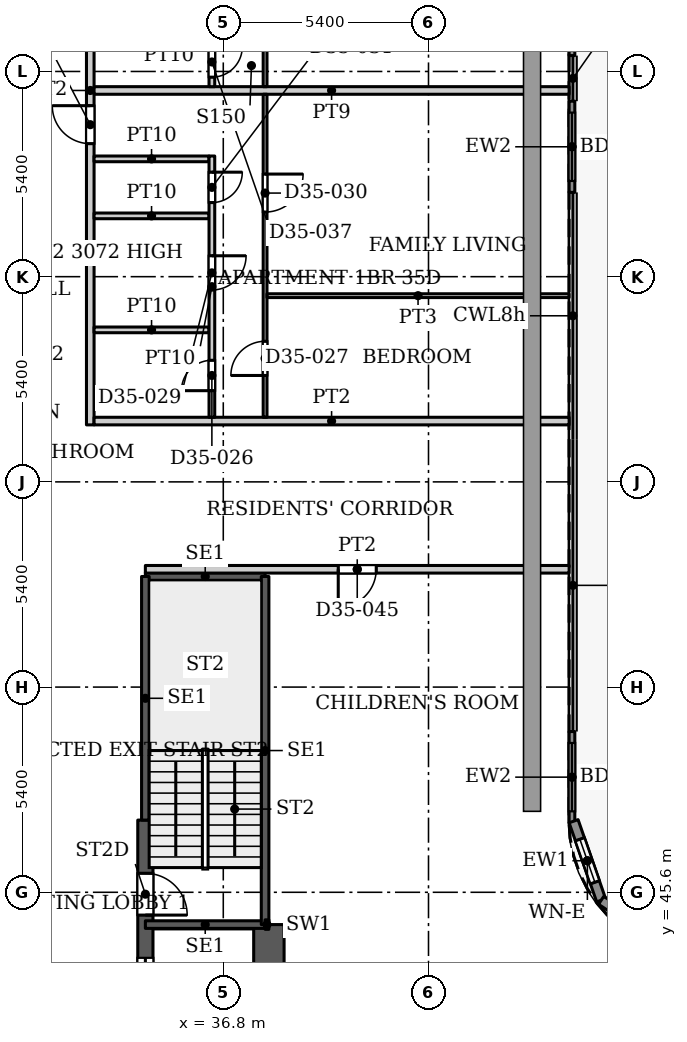
"""IFC4 building model, lengths in metres.
Left out: names, types, materials, properties, quantities, classifications, styles, units other than length and angle.
Written with IfcOpenShell. Run it as: python <this file> out.ifc"""

import sys

from ifc_helpers import new_model, si_unit, direction, frame, frame_2d, origin, place, context, subcontext, project, spatial, rectangle, extrude, source, transform, mapped, element, fill, save


model = new_model("IFC4")
c1 = context("Model", 3, precision=1e-05, world=origin(), true_north=direction((0.0, 1.0)))
c2 = subcontext(c1, "Body", "Model", "MODEL_VIEW")
j1 = project(units=[si_unit("LENGTHUNIT", "METRE"), si_unit("PLANEANGLEUNIT", "RADIAN")], contexts=[c1])
p1 = place(None, origin())
s1 = spatial("IfcSite", under=j1, at=p1, CompositionType="ELEMENT")
p2 = place(p1, origin())
s2 = spatial("IfcBuilding", under=s1, at=p2, CompositionType="ELEMENT")
p3 = place(p2, frame((0.0, 0.0, 152.6)))
s3 = spatial("IfcBuildingStorey", under=s2, at=p3, CompositionType="ELEMENT", Elevation=152.6)
p4 = place(p3, frame((34.75, 29.05, 0.0), z_axis=(0.0, 0.0, 1.0), x_axis=(0.0, 1.0, 0.0)))
e1 = element("IfcWall", 1, at=p4, inside=s3, PredefinedType="SHEAR", context=c2, shape_type="SweptSolid", body=[
    extrude(rectangle(XDim=18.45, YDim=0.4, at=frame_2d((9.225, 0.0))), origin(), (0.0, 0.0, 1.0), 3.9),
])
p5 = place(p4, frame((8.025, 0.0, 0.0)))
e2 = element("IfcOpeningElement", 2, at=p5, cuts=e1, PredefinedType="OPENING", context=c2, shape_type="SweptSolid", body=[
    extrude(rectangle(XDim=1.1, YDim=2.2, at=frame_2d((0.55, 1.1))), frame((0.0, 0.21, 0.0), z_axis=(0.0, -1.0, 0.0), x_axis=(1.0, 0.0, 0.0)), (0.0, 0.0, 1.0), 0.42),
])
p6 = place(p4, frame((10.875, 0.0, 0.0)))
e3 = element("IfcOpeningElement", 3, at=p6, cuts=e1, PredefinedType="OPENING", context=c2, shape_type="SweptSolid", body=[
    extrude(rectangle(XDim=1.1, YDim=2.2, at=frame_2d((0.55, 1.1))), frame((0.0, 0.21, 0.0), z_axis=(0.0, -1.0, 0.0), x_axis=(1.0, 0.0, 0.0)), (0.0, 0.0, 1.0), 0.42),
])
p7 = place(p4, frame((13.725, 0.0, 0.0)))
e4 = element("IfcOpeningElement", 4, at=p7, cuts=e1, PredefinedType="OPENING", context=c2, shape_type="SweptSolid", body=[
    extrude(rectangle(XDim=1.1, YDim=2.2, at=frame_2d((0.55, 1.1))), frame((0.0, 0.21, 0.0), z_axis=(0.0, -1.0, 0.0), x_axis=(1.0, 0.0, 0.0)), (0.0, 0.0, 1.0), 0.42),
])
p8 = place(p4, frame((15.95, 0.0, 0.0)))
e5 = element("IfcOpeningElement", 5, at=p8, cuts=e1, PredefinedType="OPENING", context=c2, shape_type="SweptSolid", body=[
    extrude(rectangle(XDim=1.1, YDim=2.2, at=frame_2d((0.55, 1.1))), frame((0.0, 0.21, 0.0), z_axis=(0.0, -1.0, 0.0), x_axis=(1.0, 0.0, 0.0)), (0.0, 0.0, 1.0), 0.42),
])
p9 = place(p3, frame((38.0, 36.2, 0.0), z_axis=(0.0, 0.0, 1.0), x_axis=(0.0, 1.0, 0.0)))
e6 = element("IfcWall", 6, at=p9, inside=s3, PredefinedType="SHEAR", context=c2, shape_type="SweptSolid", body=[
    extrude(rectangle(XDim=8.55, YDim=0.8, at=frame_2d((4.275, 0.0))), origin(), (0.0, 0.0, 1.0), 3.9),
])
p10 = place(p3, frame((45.975, 70.018, 0.0), z_axis=(0.0, 0.0, 1.0), x_axis=(0.0, -1.0, 0.0)))
e7 = element("IfcWall", 7, at=p10, inside=s3, PredefinedType="SOLIDWALL", context=c2, shape_type="SweptSolid", body=[
    extrude(rectangle(XDim=2.4, YDim=0.15, at=frame_2d((1.2, 0.0))), origin(), (0.0, 0.0, 1.0), 3.75),
])
p11 = place(p10, frame((0.3, 0.0, 0.0)))
e8 = element("IfcOpeningElement", 8, at=p11, cuts=e7, PredefinedType="OPENING", context=c2, shape_type="SweptSolid", body=[
    extrude(rectangle(XDim=1.8, YDim=2.4, at=frame_2d((0.9, 1.2))), frame((0.0, 0.085, 0.0), z_axis=(0.0, -1.0, 0.0), x_axis=(1.0, 0.0, 0.0)), (0.0, 0.0, 1.0), 0.17),
])
p12 = place(p3, frame((45.975, 66.418, 0.0), z_axis=(0.0, 0.0, 1.0), x_axis=(0.0, -1.0, 0.0)))
e9 = element("IfcWall", 9, at=p12, inside=s3, PredefinedType="SOLIDWALL", context=c2, shape_type="SweptSolid", body=[
    extrude(rectangle(XDim=2.4, YDim=0.15, at=frame_2d((1.2, 0.0))), origin(), (0.0, 0.0, 1.0), 3.75),
])
p13 = place(p12, frame((0.3, 0.0, 0.0)))
e10 = element("IfcOpeningElement", 10, at=p13, cuts=e9, PredefinedType="OPENING", context=c2, shape_type="SweptSolid", body=[
    extrude(rectangle(XDim=1.8, YDim=2.4, at=frame_2d((0.9, 1.2))), frame((0.0, 0.085, 0.0), z_axis=(0.0, -1.0, 0.0), x_axis=(1.0, 0.0, 0.0)), (0.0, 0.0, 1.0), 0.17),
])
p14 = place(p3, frame((45.975, 49.83, 0.0), z_axis=(0.0, 0.0, 1.0), x_axis=(0.0, -1.0, 0.0)))
e11 = element("IfcWall", 11, at=p14, inside=s3, PredefinedType="SOLIDWALL", context=c2, shape_type="SweptSolid", body=[
    extrude(rectangle(XDim=2.4, YDim=0.15, at=frame_2d((1.2, 0.0))), origin(), (0.0, 0.0, 1.0), 3.75),
])
p15 = place(p14, frame((0.3, 0.0, 0.0)))
e12 = element("IfcOpeningElement", 12, at=p15, cuts=e11, PredefinedType="OPENING", context=c2, shape_type="SweptSolid", body=[
    extrude(rectangle(XDim=1.8, YDim=2.4, at=frame_2d((0.9, 1.2))), frame((0.0, 0.085, 0.0), z_axis=(0.0, -1.0, 0.0), x_axis=(1.0, 0.0, 0.0)), (0.0, 0.0, 1.0), 0.17),
])
p16 = place(p3, frame((46.018, 47.471, 0.0), z_axis=(0.0, 0.0, 1.0), x_axis=(0.328791208903, -0.944402637093, 0.0)))
e13 = element("IfcWall", 13, at=p16, inside=s3, PredefinedType="SOLIDWALL", context=c2, shape_type="SweptSolid", body=[
    extrude(rectangle(XDim=2.205, YDim=0.25, at=frame_2d((1.102, 0.0))), origin(), (0.0, 0.0, 1.0), 3.75),
])
p17 = place(p16, frame((0.503, 0.0, 0.6)))
e14 = element("IfcOpeningElement", 14, at=p17, cuts=e13, PredefinedType="OPENING", context=c2, shape_type="SweptSolid", body=[
    extrude(rectangle(XDim=1.2, YDim=2.1, at=frame_2d((0.6, 1.05))), frame((0.0, 0.135, 0.0), z_axis=(0.0, -1.0, 0.0), x_axis=(1.0, 0.0, 0.0)), (0.0, 0.0, 1.0), 0.27),
])
p18 = place(p3, frame((46.743, 45.389, 0.0), z_axis=(0.0, 0.0, 1.0), x_axis=(0.831449265529, -0.555600682912, 0.0)))
e15 = element("IfcWall", 15, at=p18, inside=s3, PredefinedType="SOLIDWALL", context=c2, shape_type="SweptSolid", body=[
    extrude(rectangle(XDim=2.251, YDim=0.25, at=frame_2d((1.126, 0.0))), origin(), (0.0, 0.0, 1.0), 3.75),
])
p19 = place(p18, frame((0.525, 0.0, 0.6)))
e16 = element("IfcOpeningElement", 16, at=p19, cuts=e15, PredefinedType="OPENING", context=c2, shape_type="SweptSolid", body=[
    extrude(rectangle(XDim=1.2, YDim=2.1, at=frame_2d((0.6, 1.05))), frame((0.0, 0.135, 0.0), z_axis=(0.0, -1.0, 0.0), x_axis=(1.0, 0.0, 0.0)), (0.0, 0.0, 1.0), 0.27),
])
for number, where, z_axis, x_axis in (
    (17, (34.75, 44.75, 0.0), (0.0, 0.0, 1.0), (1.0, 0.0, 0.0)),
    (18, (34.75, 53.91, 0.0), (0.0, 0.0, 1.0), (1.0, 0.0, 0.0)),
):
    element("IfcWall", number, at=place(p3, frame(where, z_axis=z_axis, x_axis=x_axis)), inside=s3, PredefinedType="SHEAR", context=c2, shape_type="SweptSolid", body=[
        extrude(rectangle(XDim=3.15, YDim=0.2, at=frame_2d((1.575, 0.0))), origin(), (0.0, 0.0, 1.0), 3.9),
    ])
p20 = place(p3, frame((34.75, 47.5, 0.0), z_axis=(0.0, 0.0, 1.0), x_axis=(0.0, 1.0, 0.0)))
e19 = element("IfcWall", 19, at=p20, inside=s3, PredefinedType="SHEAR", context=c2, shape_type="SweptSolid", body=[
    extrude(rectangle(XDim=6.41, YDim=0.2, at=frame_2d((3.205, 0.0))), origin(), (0.0, 0.0, 1.0), 3.9),
])
p21 = place(p3, frame((37.9, 44.75, 0.0), z_axis=(0.0, 0.0, 1.0), x_axis=(0.0, 1.0, 0.0)))
e20 = element("IfcWall", 20, at=p21, inside=s3, PredefinedType="SHEAR", context=c2, shape_type="SweptSolid", body=[
    extrude(rectangle(XDim=9.16, YDim=0.2, at=frame_2d((4.58, 0.0))), origin(), (0.0, 0.0, 1.0), 3.9),
])
p22 = place(p3, frame((37.9, 44.75, 0.0), z_axis=(0.0, 0.0, 1.0), x_axis=(1.0, 0.0, 0.0)))
e21 = element("IfcWall", 21, at=p22, inside=s3, PredefinedType="PARTITIONING", context=c2, shape_type="SweptSolid", body=[
    extrude(rectangle(XDim=0.1, YDim=0.25, at=frame_2d((0.05, 0.0))), origin(), (0.0, 0.0, 1.0), 3.9),
])
p23 = place(p3, frame((33.3, 57.9, 0.0), z_axis=(0.0, 0.0, 1.0), x_axis=(0.0, 1.0, 0.0)))
e22 = element("IfcWall", 22, at=p23, inside=s3, PredefinedType="PARTITIONING", context=c2, shape_type="SweptSolid", body=[
    extrude(rectangle(XDim=17.6, YDim=0.2, at=frame_2d((8.8, 0.0))), origin(), (0.0, 0.0, 1.0), 3.6),
])
p24 = place(p23, frame((7.4, 0.0, 0.0)))
e23 = element("IfcOpeningElement", 23, at=p24, cuts=e22, PredefinedType="OPENING", context=c2, shape_type="SweptSolid", body=[
    extrude(rectangle(XDim=1.0, YDim=2.1, at=frame_2d((0.5, 1.05))), frame((0.0, 0.11, 0.0), z_axis=(0.0, -1.0, 0.0), x_axis=(1.0, 0.0, 0.0)), (0.0, 0.0, 1.0), 0.22),
])
p25 = place(p23, frame((13.1, 0.0, 0.0)))
e24 = element("IfcOpeningElement", 24, at=p25, cuts=e22, PredefinedType="OPENING", context=c2, shape_type="SweptSolid", body=[
    extrude(rectangle(XDim=1.0, YDim=2.1, at=frame_2d((0.5, 1.05))), frame((0.0, 0.11, 0.0), z_axis=(0.0, -1.0, 0.0), x_axis=(1.0, 0.0, 0.0)), (0.0, 0.0, 1.0), 0.22),
])
p26 = place(p3, frame((33.4, 58.0, 0.0), z_axis=(0.0, 0.0, 1.0), x_axis=(1.0, 0.0, 0.0)))
e25 = element("IfcWall", 25, at=p26, inside=s3, PredefinedType="PARTITIONING", context=c2, shape_type="SweptSolid", body=[
    extrude(rectangle(XDim=12.5, YDim=0.2, at=frame_2d((6.25, 0.0))), origin(), (0.0, 0.0, 1.0), 3.6),
])
for number, where, z_axis, x_axis in (
    (26, (33.4, 60.4, 0.0), (0.0, 0.0, 1.0), (1.0, 0.0, 0.0)),
    (27, (33.4, 63.4, 0.0), (0.0, 0.0, 1.0), (1.0, 0.0, 0.0)),
    (28, (33.4, 64.9, 0.0), (0.0, 0.0, 1.0), (1.0, 0.0, 0.0)),
):
    element("IfcWall", number, at=place(p3, frame(where, z_axis=z_axis, x_axis=x_axis)), inside=s3, PredefinedType="PARTITIONING", context=c2, shape_type="SweptSolid", body=[
        extrude(rectangle(XDim=3.025, YDim=0.15, at=frame_2d((1.513, 0.0))), origin(), (0.0, 0.0, 1.0), 3.6),
    ])
p27 = place(p3, frame((33.4, 66.7, 0.0), z_axis=(0.0, 0.0, 1.0), x_axis=(1.0, 0.0, 0.0)))
e29 = element("IfcWall", 29, at=p27, inside=s3, PredefinedType="PARTITIONING", context=c2, shape_type="SweptSolid", body=[
    extrude(rectangle(XDim=12.5, YDim=0.2, at=frame_2d((6.25, 0.0))), origin(), (0.0, 0.0, 1.0), 3.6),
])
p28 = place(p3, frame((34.75, 54.1, 0.0), z_axis=(0.0, 0.0, 1.0), x_axis=(1.0, 0.0, 0.0)))
e30 = element("IfcWall", 30, at=p28, inside=s3, PredefinedType="PARTITIONING", context=c2, shape_type="SweptSolid", body=[
    extrude(rectangle(XDim=11.15, YDim=0.2, at=frame_2d((5.575, 0.0))), origin(), (0.0, 0.0, 1.0), 3.6),
])
p29 = place(p28, frame((5.075, 0.0, 0.0)))
e31 = element("IfcOpeningElement", 31, at=p29, cuts=e30, PredefinedType="OPENING", context=c2, shape_type="SweptSolid", body=[
    extrude(rectangle(XDim=1.0, YDim=2.1, at=frame_2d((0.5, 1.05))), frame((0.0, 0.11, 0.0), z_axis=(0.0, -1.0, 0.0), x_axis=(1.0, 0.0, 0.0)), (0.0, 0.0, 1.0), 0.22),
])
p30 = place(p3, frame((36.5, 58.1, 0.0), z_axis=(0.0, 0.0, 1.0), x_axis=(0.0, 1.0, 0.0)))
e32 = element("IfcWall", 32, at=p30, inside=s3, PredefinedType="PARTITIONING", context=c2, shape_type="SweptSolid", body=[
    extrude(rectangle(XDim=6.875, YDim=0.15, at=frame_2d((3.438, 0.0))), origin(), (0.0, 0.0, 1.0), 3.6),
])
p31 = place(p30, frame((0.7, 0.0, 0.0)))
e33 = element("IfcOpeningElement", 33, at=p31, cuts=e32, PredefinedType="OPENING", context=c2, shape_type="SweptSolid", body=[
    extrude(rectangle(XDim=0.8, YDim=2.1, at=frame_2d((0.4, 1.05))), frame((0.0, 0.085, 0.0), z_axis=(0.0, -1.0, 0.0), x_axis=(1.0, 0.0, 0.0)), (0.0, 0.0, 1.0), 0.17),
])
p32 = place(p30, frame((3.35, 0.0, 0.0)))
e34 = element("IfcOpeningElement", 34, at=p32, cuts=e32, PredefinedType="OPENING", context=c2, shape_type="SweptSolid", body=[
    extrude(rectangle(XDim=0.9, YDim=2.1, at=frame_2d((0.45, 1.05))), frame((0.0, 0.085, 0.0), z_axis=(0.0, -1.0, 0.0), x_axis=(1.0, 0.0, 0.0)), (0.0, 0.0, 1.0), 0.17),
])
p33 = place(p30, frame((5.65, 0.0, 0.0)))
e35 = element("IfcOpeningElement", 35, at=p33, cuts=e32, PredefinedType="OPENING", context=c2, shape_type="SweptSolid", body=[
    extrude(rectangle(XDim=0.8, YDim=2.1, at=frame_2d((0.4, 1.05))), frame((0.0, 0.085, 0.0), z_axis=(0.0, -1.0, 0.0), x_axis=(1.0, 0.0, 0.0)), (0.0, 0.0, 1.0), 0.17),
])
p34 = place(p3, frame((36.5, 66.8, 0.0), z_axis=(0.0, 0.0, 1.0), x_axis=(0.0, 1.0, 0.0)))
e36 = element("IfcWall", 36, at=p34, inside=s3, PredefinedType="PARTITIONING", context=c2, shape_type="SweptSolid", body=[
    extrude(rectangle(XDim=3.875, YDim=0.15, at=frame_2d((1.938, 0.0))), origin(), (0.0, 0.0, 1.0), 3.6),
])
p35 = place(p34, frame((2.2, 0.0, 0.0)))
e37 = element("IfcOpeningElement", 37, at=p35, cuts=e36, PredefinedType="OPENING", context=c2, shape_type="SweptSolid", body=[
    extrude(rectangle(XDim=0.8, YDim=2.1, at=frame_2d((0.4, 1.05))), frame((0.0, 0.085, 0.0), z_axis=(0.0, -1.0, 0.0), x_axis=(1.0, 0.0, 0.0)), (0.0, 0.0, 1.0), 0.17),
])
p36 = place(p34, frame((0.25, 0.0, 0.0)))
e38 = element("IfcOpeningElement", 38, at=p36, cuts=e36, PredefinedType="OPENING", context=c2, shape_type="SweptSolid", body=[
    extrude(rectangle(XDim=0.8, YDim=2.1, at=frame_2d((0.4, 1.05))), frame((0.0, 0.085, 0.0), z_axis=(0.0, -1.0, 0.0), x_axis=(1.0, 0.0, 0.0)), (0.0, 0.0, 1.0), 0.17),
])
p37 = place(p3, frame((37.9, 58.1, 0.0), z_axis=(0.0, 0.0, 1.0), x_axis=(0.0, 1.0, 0.0)))
e39 = element("IfcWall", 39, at=p37, inside=s3, PredefinedType="PARTITIONING", context=c2, shape_type="SweptSolid", body=[
    extrude(rectangle(XDim=8.5, YDim=0.1, at=frame_2d((4.25, 0.0))), origin(), (0.0, 0.0, 1.0), 3.6),
])
p38 = place(p37, frame((1.1, 0.0, 0.0)))
e40 = element("IfcOpeningElement", 40, at=p38, cuts=e39, PredefinedType="OPENING", context=c2, shape_type="SweptSolid", body=[
    extrude(rectangle(XDim=0.9, YDim=2.1, at=frame_2d((0.45, 1.05))), frame((0.0, 0.06, 0.0), z_axis=(0.0, -1.0, 0.0), x_axis=(1.0, 0.0, 0.0)), (0.0, 0.0, 1.0), 0.12),
])
p39 = place(p37, frame((5.4, 0.0, 0.0)))
e41 = element("IfcOpeningElement", 41, at=p39, cuts=e39, PredefinedType="OPENING", context=c2, shape_type="SweptSolid", body=[
    extrude(rectangle(XDim=1.0, YDim=2.1, at=frame_2d((0.5, 1.05))), frame((0.0, 0.06, 0.0), z_axis=(0.0, -1.0, 0.0), x_axis=(1.0, 0.0, 0.0)), (0.0, 0.0, 1.0), 0.12),
])
p40 = place(p3, frame((37.9, 66.8, 0.0), z_axis=(0.0, 0.0, 1.0), x_axis=(0.0, 1.0, 0.0)))
e42 = element("IfcWall", 42, at=p40, inside=s3, PredefinedType="PARTITIONING", context=c2, shape_type="SweptSolid", body=[
    extrude(rectangle(XDim=8.5, YDim=0.1, at=frame_2d((4.25, 0.0))), origin(), (0.0, 0.0, 1.0), 3.6),
])
p41 = place(p40, frame((6.2, 0.0, 0.0)))
e43 = element("IfcOpeningElement", 43, at=p41, cuts=e42, PredefinedType="OPENING", context=c2, shape_type="SweptSolid", body=[
    extrude(rectangle(XDim=0.9, YDim=2.1, at=frame_2d((0.45, 1.05))), frame((0.0, 0.06, 0.0), z_axis=(0.0, -1.0, 0.0), x_axis=(1.0, 0.0, 0.0)), (0.0, 0.0, 1.0), 0.12),
])
p42 = place(p40, frame((1.8, 0.0, 0.0)))
e44 = element("IfcOpeningElement", 44, at=p42, cuts=e42, PredefinedType="OPENING", context=c2, shape_type="SweptSolid", body=[
    extrude(rectangle(XDim=1.0, YDim=2.1, at=frame_2d((0.5, 1.05))), frame((0.0, 0.06, 0.0), z_axis=(0.0, -1.0, 0.0), x_axis=(1.0, 0.0, 0.0)), (0.0, 0.0, 1.0), 0.12),
])
p43 = place(p3, frame((37.95, 61.3, 0.0), z_axis=(0.0, 0.0, 1.0), x_axis=(1.0, 0.0, 0.0)))
e45 = element("IfcWall", 45, at=p43, inside=s3, PredefinedType="PARTITIONING", context=c2, shape_type="SweptSolid", body=[
    extrude(rectangle(XDim=7.95, YDim=0.1, at=frame_2d((3.975, 0.0))), origin(), (0.0, 0.0, 1.0), 3.6),
])
m1 = source(origin(), c2, "Body", "SweptSolid", [
    extrude(rectangle(XDim=1.8, YDim=2.4, at=frame_2d((0.9, 1.2))), frame((0.0, 0.025, 0.0), z_axis=(0.0, -1.0, 0.0), x_axis=(1.0, 0.0, 0.0)), (0.0, 0.0, 1.0), 0.05),
])
p44 = place(p13, origin())
e46 = element("IfcDoor", 46, at=p44, inside=s3, OperationType="SLIDING_TO_LEFT", PredefinedType="DOOR", context=c2, shape_type="MappedRepresentation", body=[
    mapped(m1, transform((0.0, 0.0, 0.0), x_axis=(1.0, 0.0, 0.0), y_axis=(0.0, 1.0, 0.0), z_axis=(0.0, 0.0, 1.0), scale=1.0)),
])
fill(e10, e46)
p45 = place(p15, origin())
e47 = element("IfcDoor", 47, at=p45, inside=s3, OperationType="SLIDING_TO_LEFT", PredefinedType="DOOR", context=c2, shape_type="MappedRepresentation", body=[
    mapped(m1, transform((0.0, 0.0, 0.0), x_axis=(1.0, 0.0, 0.0), y_axis=(0.0, 1.0, 0.0), z_axis=(0.0, 0.0, 1.0), scale=1.0)),
])
fill(e12, e47)
m2 = source(origin(), c2, "Body", "SweptSolid", [
    extrude(rectangle(XDim=1.2, YDim=2.1, at=frame_2d((0.6, 1.05))), frame((0.0, 0.03, 0.0), z_axis=(0.0, -1.0, 0.0), x_axis=(1.0, 0.0, 0.0)), (0.0, 0.0, 1.0), 0.06),
])
p46 = place(p17, origin())
e48 = element("IfcWindow", 48, at=p46, inside=s3, PartitioningType="SINGLE_PANEL", PredefinedType="WINDOW", context=c2, shape_type="MappedRepresentation", body=[
    mapped(m2, transform((0.0, 0.0, 0.0), x_axis=(1.0, 0.0, 0.0), y_axis=(0.0, 1.0, 0.0), z_axis=(0.0, 0.0, 1.0), scale=1.0)),
])
fill(e14, e48)
m3 = source(origin(), c2, "Body", "SweptSolid", [
    extrude(rectangle(XDim=1.1, YDim=2.2, at=frame_2d((0.55, 1.1))), frame((0.0, 0.025, 0.0), z_axis=(0.0, -1.0, 0.0), x_axis=(1.0, 0.0, 0.0)), (0.0, 0.0, 1.0), 0.05),
])
p47 = place(p7, origin())
e49 = element("IfcDoor", 49, at=p47, inside=s3, OperationType="SLIDING_TO_LEFT", PredefinedType="DOOR", context=c2, shape_type="MappedRepresentation", body=[
    mapped(m3, transform((0.0, 0.0, 0.0), x_axis=(1.0, 0.0, 0.0), y_axis=(0.0, 1.0, 0.0), z_axis=(0.0, 0.0, 1.0), scale=1.0)),
])
fill(e4, e49)
m4 = source(origin(), c2, "Body", "SweptSolid", [
    extrude(rectangle(XDim=1.1, YDim=2.2, at=frame_2d((0.55, 1.1))), frame((0.0, 0.025, 0.0), z_axis=(0.0, -1.0, 0.0), x_axis=(1.0, 0.0, 0.0)), (0.0, 0.0, 1.0), 0.05),
])
p48 = place(p8, origin())
e50 = element("IfcDoor", 50, at=p48, inside=s3, OperationType="SINGLE_SWING_RIGHT", PredefinedType="DOOR", context=c2, shape_type="MappedRepresentation", body=[
    mapped(m4, transform((0.0, 0.0, 0.0), x_axis=(1.0, 0.0, 0.0), y_axis=(0.0, 1.0, 0.0), z_axis=(0.0, 0.0, 1.0), scale=1.0)),
])
fill(e5, e50)
m5 = source(origin(), c2, "Body", "SweptSolid", [
    extrude(rectangle(XDim=0.8, YDim=2.1, at=frame_2d((0.4, 1.05))), frame((0.0, 0.025, 0.0), z_axis=(0.0, -1.0, 0.0), x_axis=(1.0, 0.0, 0.0)), (0.0, 0.0, 1.0), 0.05),
])
p49 = place(p31, origin())
e51 = element("IfcDoor", 51, at=p49, inside=s3, OperationType="SINGLE_SWING_LEFT", PredefinedType="DOOR", context=c2, shape_type="MappedRepresentation", body=[
    mapped(m5, transform((0.0, 0.0, 0.0), x_axis=(1.0, 0.0, 0.0), y_axis=(0.0, 1.0, 0.0), z_axis=(0.0, 0.0, 1.0), scale=1.0)),
])
fill(e33, e51)
m6 = source(origin(), c2, "Body", "SweptSolid", [
    extrude(rectangle(XDim=0.9, YDim=2.1, at=frame_2d((0.45, 1.05))), frame((0.0, 0.025, 0.0), z_axis=(0.0, -1.0, 0.0), x_axis=(1.0, 0.0, 0.0)), (0.0, 0.0, 1.0), 0.05),
])
p50 = place(p38, origin())
e52 = element("IfcDoor", 52, at=p50, inside=s3, OperationType="SINGLE_SWING_LEFT", PredefinedType="DOOR", context=c2, shape_type="MappedRepresentation", body=[
    mapped(m6, transform((0.0, 0.0, 0.0), x_axis=(1.0, 0.0, 0.0), y_axis=(0.0, 1.0, 0.0), z_axis=(0.0, 0.0, 1.0), scale=1.0)),
])
fill(e40, e52)
m7 = source(origin(), c2, "Body", "SweptSolid", [
    extrude(rectangle(XDim=1.0, YDim=2.1, at=frame_2d((0.5, 1.05))), frame((0.0, 0.025, 0.0), z_axis=(0.0, -1.0, 0.0), x_axis=(1.0, 0.0, 0.0)), (0.0, 0.0, 1.0), 0.05),
])
p51 = place(p24, origin())
e53 = element("IfcDoor", 53, at=p51, inside=s3, OperationType="SINGLE_SWING_LEFT", PredefinedType="DOOR", context=c2, shape_type="MappedRepresentation", body=[
    mapped(m7, transform((0.0, 0.0, 0.0), x_axis=(1.0, 0.0, 0.0), y_axis=(0.0, 1.0, 0.0), z_axis=(0.0, 0.0, 1.0), scale=1.0)),
])
fill(e23, e53)
p52 = place(p32, origin())
e54 = element("IfcDoor", 54, at=p52, inside=s3, OperationType="SINGLE_SWING_RIGHT", PredefinedType="DOOR", context=c2, shape_type="MappedRepresentation", body=[
    mapped(m6, transform((0.0, 0.0, 0.0), x_axis=(1.0, 0.0, 0.0), y_axis=(0.0, 1.0, 0.0), z_axis=(0.0, 0.0, 1.0), scale=1.0)),
])
fill(e34, e54)
m8 = source(origin(), c2, "Body", "SweptSolid", [
    extrude(rectangle(XDim=1.0, YDim=2.1, at=frame_2d((0.5, 1.05))), frame((0.0, 0.025, 0.0), z_axis=(0.0, -1.0, 0.0), x_axis=(1.0, 0.0, 0.0)), (0.0, 0.0, 1.0), 0.05),
])
p53 = place(p39, origin())
e55 = element("IfcDoor", 55, at=p53, inside=s3, OperationType="SINGLE_SWING_RIGHT", PredefinedType="DOOR", context=c2, shape_type="MappedRepresentation", body=[
    mapped(m8, transform((0.0, 0.0, 0.0), x_axis=(1.0, 0.0, 0.0), y_axis=(0.0, 1.0, 0.0), z_axis=(0.0, 0.0, 1.0), scale=1.0)),
])
fill(e41, e55)
p54 = place(p33, origin())
e56 = element("IfcDoor", 56, at=p54, inside=s3, OperationType="SINGLE_SWING_RIGHT", PredefinedType="DOOR", context=c2, shape_type="MappedRepresentation", body=[
    mapped(m5, transform((0.0, 0.0, 0.0), x_axis=(1.0, 0.0, 0.0), y_axis=(0.0, 1.0, 0.0), z_axis=(0.0, 0.0, 1.0), scale=1.0)),
])
fill(e35, e56)
p55 = place(p36, origin())
e57 = element("IfcDoor", 57, at=p55, inside=s3, OperationType="SINGLE_SWING_RIGHT", PredefinedType="DOOR", context=c2, shape_type="MappedRepresentation", body=[
    mapped(m5, transform((0.0, 0.0, 0.0), x_axis=(1.0, 0.0, 0.0), y_axis=(0.0, 1.0, 0.0), z_axis=(0.0, 0.0, 1.0), scale=1.0)),
])
fill(e38, e57)
m9 = source(origin(), c2, "Body", "SweptSolid", [
    extrude(rectangle(XDim=1.0, YDim=2.1, at=frame_2d((0.5, 1.05))), frame((0.0, 0.025, 0.0), z_axis=(0.0, -1.0, 0.0), x_axis=(1.0, 0.0, 0.0)), (0.0, 0.0, 1.0), 0.05),
])
p56 = place(p29, origin())
e58 = element("IfcDoor", 58, at=p56, inside=s3, OperationType="SINGLE_SWING_RIGHT", PredefinedType="DOOR", context=c2, shape_type="MappedRepresentation", body=[
    mapped(m9, transform((0.0, 0.0, 0.0), x_axis=(1.0, 0.0, 0.0), y_axis=(0.0, 1.0, 0.0), z_axis=(0.0, 0.0, 1.0), scale=1.0)),
])
fill(e31, e58)
save(model, sys.argv[1])
